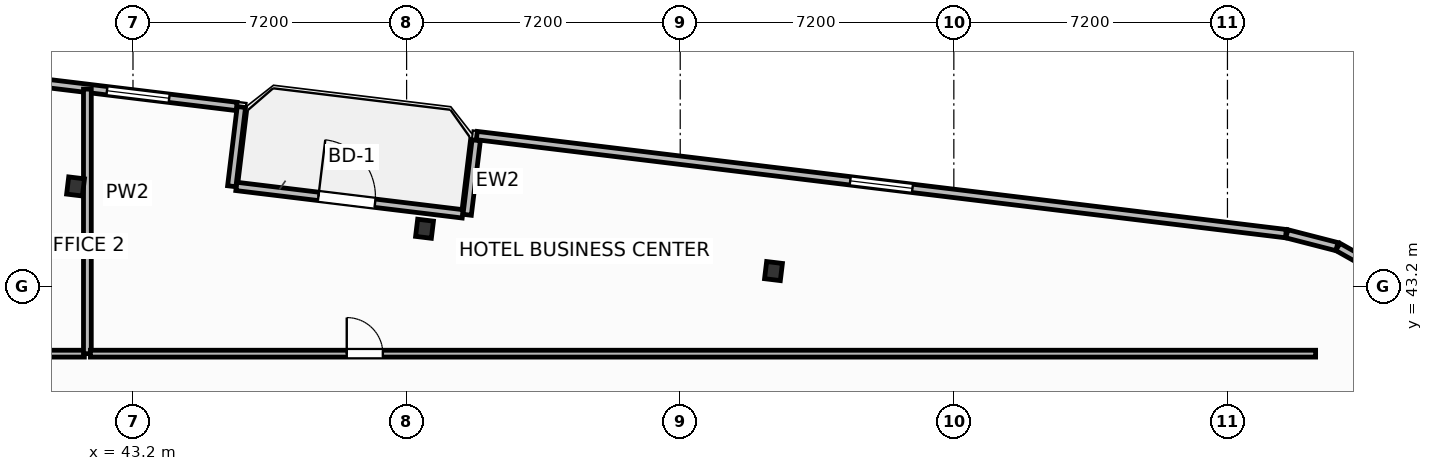
"""IFC4 building model, lengths in metres.
Left out: names, types, materials, properties, quantities, classifications, styles, units other than length and angle.
Written with IfcOpenShell. Run it as: python <this file> out.ifc"""

import sys

from ifc_helpers import new_model, si_unit, direction, frame, frame_2d, origin, origin_2d, place, context, subcontext, project, spatial, rectangle, i_section, extrude, element, fill, save


model = new_model("IFC4")
c1 = context("Model", 3, precision=1e-05, world=origin(), true_north=direction((0.0, 1.0)))
c2 = subcontext(c1, "Body", "Model", "MODEL_VIEW")
j1 = project(units=[si_unit("LENGTHUNIT", "METRE"), si_unit("PLANEANGLEUNIT", "RADIAN")], contexts=[c1])
p1 = place(None, origin())
s1 = spatial("IfcSite", under=j1, at=p1, CompositionType="ELEMENT")
p2 = place(p1, origin())
s2 = spatial("IfcBuilding", under=s1, at=p2, CompositionType="ELEMENT")
p3 = place(p2, frame((0.0, 0.0, 136.5)))
s3 = spatial("IfcBuildingStorey", under=s2, at=p3, CompositionType="ELEMENT", Elevation=136.5)
for number, where, z_axis, x_axis in (
    (1, (60.054, 43.603, 0.0), (0.0, 0.0, 1.0), (0.993, -0.12, 0.0)),
    (2, (50.872, 44.717, 0.0), (0.0, 0.0, 1.0), (0.993, -0.12, 0.0)),
    (3, (41.689, 45.83, 0.0), (0.0, 0.0, 1.0), (0.993, -0.12, 0.0)),
):
    element("IfcColumn", number, at=place(p3, frame(where, z_axis=z_axis, x_axis=x_axis)), inside=s3, PredefinedType="COLUMN", context=c2, shape_type="SweptSolid", body=[
        extrude(i_section(OverallWidth=0.418, OverallDepth=0.455, WebThickness=0.042, FlangeThickness=0.068, FilletRadius=0.025, at=origin_2d()), origin(), (0.0, 0.0, 1.0), 3.7),
    ])
p4 = place(p3, frame((45.92, 45.831, 0.0), z_axis=(0.0, 0.0, 1.0), x_axis=(0.992729951822, -0.120362962556, 0.0)))
e4 = element("IfcWall", 4, at=p4, inside=s3, PredefinedType="SOLIDWALL", context=c2, shape_type="SweptSolid", body=[
    extrude(rectangle(XDim=6.0, YDim=0.22, at=frame_2d((3.0, 0.0))), origin(), (0.0, 0.0, 1.0), 2.73),
])
p5 = place(p4, frame((2.176, 0.0, 0.0)))
e5 = element("IfcOpeningElement", 5, at=p5, cuts=e4, PredefinedType="OPENING", context=c2, shape_type="SweptSolid", body=[
    extrude(rectangle(XDim=1.5, YDim=2.25, at=frame_2d((0.75, 1.125))), frame((0.0, 0.12, 0.0), z_axis=(0.0, -1.0, 0.0), x_axis=(1.0, 0.0, 0.0)), (0.0, 0.0, 1.0), 0.24),
])
p6 = place(p3, frame((76.084, 43.575, 0.0), z_axis=(0.0, 0.0, 1.0), x_axis=(-0.871093268227, 0.491117621399, 0.0)))
e6 = element("IfcWall", 6, at=p6, inside=s3, PredefinedType="SOLIDWALL", context=c2, shape_type="SweptSolid", body=[
    extrude(rectangle(XDim=1.353, YDim=0.22, at=frame_2d((0.677, 0.0))), origin(), (0.0, 0.0, 1.0), 2.73),
])
p7 = place(p3, frame((74.881, 44.246, 0.0), z_axis=(0.0, 0.0, 1.0), x_axis=(-0.968549775063, 0.248819881091, 0.0)))
e7 = element("IfcWall", 7, at=p7, inside=s3, PredefinedType="SOLIDWALL", context=c2, shape_type="SweptSolid", body=[
    extrude(rectangle(XDim=1.361, YDim=0.22, at=frame_2d((0.68, 0.0))), origin(), (0.0, 0.0, 1.0), 2.73),
])
p8 = place(p3, frame((73.538, 44.588, 0.0), z_axis=(0.0, 0.0, 1.0), x_axis=(-0.992733493583, 0.120333747213, 0.0)))
e8 = element("IfcWall", 8, at=p8, inside=s3, PredefinedType="SOLIDWALL", context=c2, shape_type="SweptSolid", body=[
    extrude(rectangle(XDim=21.447, YDim=0.22, at=frame_2d((10.724, 0.0))), origin(), (0.0, 0.0, 1.0), 2.73),
])
p9 = place(p8, frame((9.899, 0.0, 0.8)))
e9 = element("IfcOpeningElement", 9, at=p9, cuts=e8, PredefinedType="OPENING", context=c2, shape_type="SweptSolid", body=[
    extrude(rectangle(XDim=1.65, YDim=1.65, at=frame_2d((0.825, 0.825))), frame((0.0, 0.12, 0.0), z_axis=(0.0, -1.0, 0.0), x_axis=(1.0, 0.0, 0.0)), (0.0, 0.0, 1.0), 0.24),
])
p10 = place(p3, frame((52.231, 47.045, 0.0), z_axis=(0.0, 0.0, 1.0), x_axis=(-0.120275992932, -0.992740492538, 0.0)))
e10 = element("IfcWall", 10, at=p10, inside=s3, PredefinedType="SOLIDWALL", context=c2, shape_type="SweptSolid", body=[
    extrude(rectangle(XDim=1.975, YDim=0.22, at=frame_2d((0.988, 0.0))), origin(), (0.0, 0.0, 1.0), 2.73),
])
p11 = place(p3, frame((45.799, 45.835, 0.0), z_axis=(0.0, 0.0, 1.0), x_axis=(0.120314009587, 0.992735885871, 0.0)))
e11 = element("IfcWall", 11, at=p11, inside=s3, PredefinedType="SOLIDWALL", context=c2, shape_type="SweptSolid", body=[
    extrude(rectangle(XDim=2.1, YDim=0.22, at=frame_2d((1.05, 0.0))), origin(), (0.0, 0.0, 1.0), 2.73),
])
p12 = place(p3, frame((45.928, 47.935, 0.0), z_axis=(0.0, 0.0, 1.0), x_axis=(-0.992730591876, 0.120357683402, 0.0)))
e12 = element("IfcWall", 12, at=p12, inside=s3, PredefinedType="SOLIDWALL", context=c2, shape_type="SweptSolid", body=[
    extrude(rectangle(XDim=8.035, YDim=0.22, at=frame_2d((4.017, 0.0))), origin(), (0.0, 0.0, 1.0), 2.73),
])
p13 = place(p12, frame((1.788, 0.0, 0.8)))
e13 = element("IfcOpeningElement", 13, at=p13, cuts=e12, PredefinedType="OPENING", context=c2, shape_type="SweptSolid", body=[
    extrude(rectangle(XDim=1.65, YDim=1.65, at=frame_2d((0.825, 0.825))), frame((0.0, 0.12, 0.0), z_axis=(0.0, -1.0, 0.0), x_axis=(1.0, 0.0, 0.0)), (0.0, 0.0, 1.0), 0.24),
])
p14 = place(p3, frame((28.08, 41.43, 0.0), z_axis=(0.0, 0.0, 1.0), x_axis=(1.0, 0.0, 0.0)))
e14 = element("IfcWall", 14, at=p14, inside=s3, PredefinedType="PARTITIONING", context=c2, shape_type="SweptSolid", body=[
    extrude(rectangle(XDim=13.84, YDim=0.18, at=frame_2d((6.92, 0.0))), origin(), (0.0, 0.0, 1.0), 3.45),
])
p15 = place(p14, frame((6.445, 0.0, 0.0)))
e15 = element("IfcOpeningElement", 15, at=p15, cuts=e14, PredefinedType="OPENING", context=c2, shape_type="SweptSolid", body=[
    extrude(rectangle(XDim=0.95, YDim=2.05, at=frame_2d((0.475, 1.025))), frame((0.0, 0.1, 0.0), z_axis=(0.0, -1.0, 0.0), x_axis=(1.0, 0.0, 0.0)), (0.0, 0.0, 1.0), 0.2),
])
p16 = place(p3, frame((42.0, 41.43, 0.0), z_axis=(0.0, 0.0, 1.0), x_axis=(0.0, 1.0, 0.0)))
e16 = element("IfcWall", 16, at=p16, inside=s3, PredefinedType="PARTITIONING", context=c2, shape_type="SweptSolid", body=[
    extrude(rectangle(XDim=6.961, YDim=0.205, at=frame_2d((3.48, 0.0))), origin(), (0.0, 0.0, 1.0), 2.662),
])
p17 = place(p3, frame((42.08, 41.43, 0.0), z_axis=(0.0, 0.0, 1.0), x_axis=(1.0, 0.0, 0.0)))
e17 = element("IfcWall", 17, at=p17, inside=s3, PredefinedType="PARTITIONING", context=c2, shape_type="SweptSolid", body=[
    extrude(rectangle(XDim=32.24, YDim=0.18, at=frame_2d((16.12, 0.0))), origin(), (0.0, 0.0, 1.0), 3.45),
])
p18 = place(p17, frame((6.745, 0.0, 0.0)))
e18 = element("IfcOpeningElement", 18, at=p18, cuts=e17, PredefinedType="OPENING", context=c2, shape_type="SweptSolid", body=[
    extrude(rectangle(XDim=0.95, YDim=2.05, at=frame_2d((0.475, 1.025))), frame((0.0, 0.1, 0.0), z_axis=(0.0, -1.0, 0.0), x_axis=(1.0, 0.0, 0.0)), (0.0, 0.0, 1.0), 0.2),
])
p19 = place(p5, origin())
e19 = element("IfcDoor", 19, at=p19, inside=s3, OperationType="SINGLE_SWING_LEFT", PredefinedType="DOOR", context=c2, shape_type="SweptSolid", body=[
    extrude(rectangle(XDim=1.5, YDim=2.25, at=frame_2d((0.75, 1.125))), frame((0.0, 0.025, 0.0), z_axis=(0.0, -1.0, 0.0), x_axis=(1.0, 0.0, 0.0)), (0.0, 0.0, 1.0), 0.05),
])
fill(e5, e19)
p20 = place(p9, origin())
e20 = element("IfcWindow", 20, at=p20, inside=s3, PartitioningType="SINGLE_PANEL", PredefinedType="WINDOW", context=c2, shape_type="SweptSolid", body=[
    extrude(rectangle(XDim=1.65, YDim=1.65, at=frame_2d((0.825, 0.825))), frame((0.0, 0.03, 0.0), z_axis=(0.0, -1.0, 0.0), x_axis=(1.0, 0.0, 0.0)), (0.0, 0.0, 1.0), 0.06),
])
fill(e9, e20)
p21 = place(p13, origin())
e21 = element("IfcWindow", 21, at=p21, inside=s3, PartitioningType="SINGLE_PANEL", PredefinedType="WINDOW", context=c2, shape_type="SweptSolid", body=[
    extrude(rectangle(XDim=1.65, YDim=1.65, at=frame_2d((0.825, 0.825))), frame((0.0, 0.03, 0.0), z_axis=(0.0, -1.0, 0.0), x_axis=(1.0, 0.0, 0.0)), (0.0, 0.0, 1.0), 0.06),
])
fill(e13, e21)
p22 = place(p18, origin())
e22 = element("IfcDoor", 22, at=p22, inside=s3, OperationType="SINGLE_SWING_LEFT", PredefinedType="DOOR", context=c2, shape_type="SweptSolid", body=[
    extrude(rectangle(XDim=0.95, YDim=2.05, at=frame_2d((0.475, 1.025))), frame((0.0, 0.025, 0.0), z_axis=(0.0, -1.0, 0.0), x_axis=(1.0, 0.0, 0.0)), (0.0, 0.0, 1.0), 0.05),
])
fill(e18, e22)
save(model, sys.argv[1])
